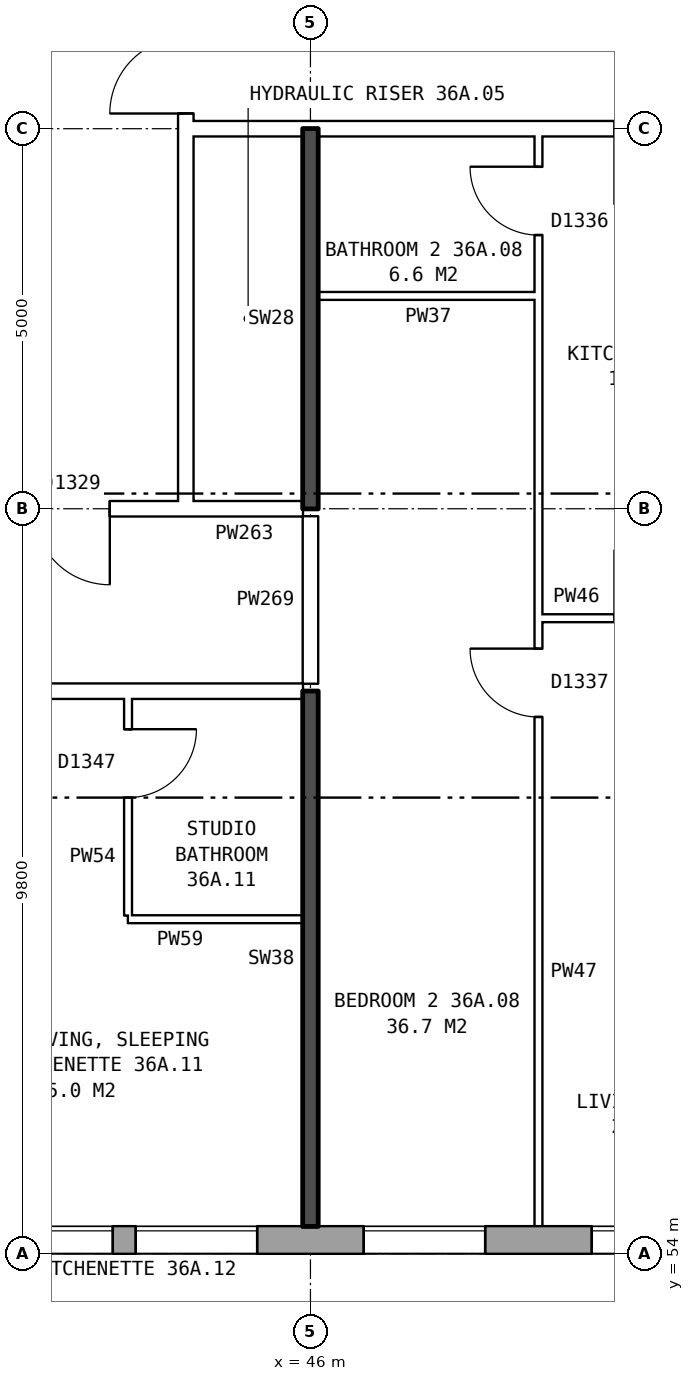
"""IFC4 building model, lengths in metres.
Left out: names, types, materials, properties, quantities, classifications, styles, units other than length and angle.
Written with IfcOpenShell. Run it as: python <this file> out.ifc"""

import sys

from ifc_helpers import new_model, si_unit, direction, frame, frame_2d, origin, place, context, subcontext, project, spatial, rectangle, extrude, element, fill, save


model = new_model("IFC4")
c1 = context("Model", 3, precision=1e-05, world=origin(), true_north=direction((0.0, 1.0)))
c2 = subcontext(c1, "Body", "Model", "MODEL_VIEW")
j1 = project(units=[si_unit("LENGTHUNIT", "METRE"), si_unit("PLANEANGLEUNIT", "RADIAN")], contexts=[c1])
p1 = place(None, origin())
s1 = spatial("IfcSite", under=j1, at=p1, CompositionType="ELEMENT")
p2 = place(p1, origin())
s2 = spatial("IfcBuilding", under=s1, at=p2, CompositionType="ELEMENT")
p3 = place(p2, frame((0.0, 0.0, 129.9)))
s3 = spatial("IfcBuildingStorey", under=s2, at=p3, CompositionType="ELEMENT", Elevation=129.9)
p4 = place(p3, frame((29.825, 54.18, 0.0), z_axis=(0.0, 0.0, 1.0), x_axis=(1.0, 0.0, 0.0)))
e1 = element("IfcWall", 1, at=p4, inside=s3, PredefinedType="STANDARD", context=c2, shape_type="SweptSolid", body=[
    extrude(rectangle(XDim=43.101, YDim=0.36, at=frame_2d((21.55, 0.0))), origin(), (0.0, 0.0, 1.0), 2.85),
])
p5 = place(p4, frame((1.875, 0.0, 0.8)))
e2 = element("IfcOpeningElement", 2, at=p5, cuts=e1, PredefinedType="OPENING", context=c2, shape_type="SweptSolid", body=[
    extrude(rectangle(XDim=1.6, YDim=1.8, at=frame_2d((0.8, 0.9))), frame((0.0, 0.19, 0.0), z_axis=(0.0, -1.0, 0.0), x_axis=(1.0, 0.0, 0.0)), (0.0, 0.0, 1.0), 0.38),
])
p6 = place(p4, frame((4.875, 0.0, 0.8)))
e3 = element("IfcOpeningElement", 3, at=p6, cuts=e1, PredefinedType="OPENING", context=c2, shape_type="SweptSolid", body=[
    extrude(rectangle(XDim=1.6, YDim=1.8, at=frame_2d((0.8, 0.9))), frame((0.0, 0.19, 0.0), z_axis=(0.0, -1.0, 0.0), x_axis=(1.0, 0.0, 0.0)), (0.0, 0.0, 1.0), 0.38),
])
p7 = place(p4, frame((6.775, 0.0, 0.8)))
e4 = element("IfcOpeningElement", 4, at=p7, cuts=e1, PredefinedType="OPENING", context=c2, shape_type="SweptSolid", body=[
    extrude(rectangle(XDim=1.6, YDim=1.8, at=frame_2d((0.8, 0.9))), frame((0.0, 0.19, 0.0), z_axis=(0.0, -1.0, 0.0), x_axis=(1.0, 0.0, 0.0)), (0.0, 0.0, 1.0), 0.38),
])
p8 = place(p4, frame((10.875, 0.0, 0.8)))
e5 = element("IfcOpeningElement", 5, at=p8, cuts=e1, PredefinedType="OPENING", context=c2, shape_type="SweptSolid", body=[
    extrude(rectangle(XDim=0.8, YDim=0.9, at=frame_2d((0.4, 0.45))), frame((0.0, 0.19, 0.0), z_axis=(0.0, -1.0, 0.0), x_axis=(1.0, 0.0, 0.0)), (0.0, 0.0, 1.0), 0.38),
])
p9 = place(p4, frame((13.875, 0.0, 0.8)))
e6 = element("IfcOpeningElement", 6, at=p9, cuts=e1, PredefinedType="OPENING", context=c2, shape_type="SweptSolid", body=[
    extrude(rectangle(XDim=1.6, YDim=1.8, at=frame_2d((0.8, 0.9))), frame((0.0, 0.19, 0.0), z_axis=(0.0, -1.0, 0.0), x_axis=(1.0, 0.0, 0.0)), (0.0, 0.0, 1.0), 0.38),
])
p10 = place(p4, frame((16.875, 0.0, 0.8)))
e7 = element("IfcOpeningElement", 7, at=p10, cuts=e1, PredefinedType="OPENING", context=c2, shape_type="SweptSolid", body=[
    extrude(rectangle(XDim=1.6, YDim=1.8, at=frame_2d((0.8, 0.9))), frame((0.0, 0.19, 0.0), z_axis=(0.0, -1.0, 0.0), x_axis=(1.0, 0.0, 0.0)), (0.0, 0.0, 1.0), 0.38),
])
p11 = place(p4, frame((19.875, 0.0, 0.8)))
e8 = element("IfcOpeningElement", 8, at=p11, cuts=e1, PredefinedType="OPENING", context=c2, shape_type="SweptSolid", body=[
    extrude(rectangle(XDim=1.6, YDim=1.8, at=frame_2d((0.8, 0.9))), frame((0.0, 0.19, 0.0), z_axis=(0.0, -1.0, 0.0), x_axis=(1.0, 0.0, 0.0)), (0.0, 0.0, 1.0), 0.38),
])
p12 = place(p4, frame((22.875, 0.0, 0.8)))
e9 = element("IfcOpeningElement", 9, at=p12, cuts=e1, PredefinedType="OPENING", context=c2, shape_type="SweptSolid", body=[
    extrude(rectangle(XDim=1.6, YDim=1.8, at=frame_2d((0.8, 0.9))), frame((0.0, 0.19, 0.0), z_axis=(0.0, -1.0, 0.0), x_axis=(1.0, 0.0, 0.0)), (0.0, 0.0, 1.0), 0.38),
])
p13 = place(p4, frame((25.875, 0.0, 0.8)))
e10 = element("IfcOpeningElement", 10, at=p13, cuts=e1, PredefinedType="OPENING", context=c2, shape_type="SweptSolid", body=[
    extrude(rectangle(XDim=1.6, YDim=1.8, at=frame_2d((0.8, 0.9))), frame((0.0, 0.19, 0.0), z_axis=(0.0, -1.0, 0.0), x_axis=(1.0, 0.0, 0.0)), (0.0, 0.0, 1.0), 0.38),
])
p14 = place(p4, frame((28.875, 0.0, 0.8)))
e11 = element("IfcOpeningElement", 11, at=p14, cuts=e1, PredefinedType="OPENING", context=c2, shape_type="SweptSolid", body=[
    extrude(rectangle(XDim=1.6, YDim=1.8, at=frame_2d((0.8, 0.9))), frame((0.0, 0.19, 0.0), z_axis=(0.0, -1.0, 0.0), x_axis=(1.0, 0.0, 0.0)), (0.0, 0.0, 1.0), 0.38),
])
p15 = place(p4, frame((31.325, 0.0, 0.15)))
e12 = element("IfcOpeningElement", 12, at=p15, cuts=e1, PredefinedType="OPENING", context=c2, shape_type="SweptSolid", body=[
    extrude(rectangle(XDim=0.6, YDim=1.8, at=frame_2d((0.3, 0.9))), frame((0.0, 0.19, 0.0), z_axis=(0.0, -1.0, 0.0), x_axis=(1.0, 0.0, 0.0)), (0.0, 0.0, 1.0), 0.38),
])
p16 = place(p4, frame((34.875, 0.0, 0.8)))
e13 = element("IfcOpeningElement", 13, at=p16, cuts=e1, PredefinedType="OPENING", context=c2, shape_type="SweptSolid", body=[
    extrude(rectangle(XDim=1.6, YDim=1.8, at=frame_2d((0.8, 0.9))), frame((0.0, 0.19, 0.0), z_axis=(0.0, -1.0, 0.0), x_axis=(1.0, 0.0, 0.0)), (0.0, 0.0, 1.0), 0.38),
])
p17 = place(p4, frame((37.875, 0.0, 0.8)))
e14 = element("IfcOpeningElement", 14, at=p17, cuts=e1, PredefinedType="OPENING", context=c2, shape_type="SweptSolid", body=[
    extrude(rectangle(XDim=1.6, YDim=1.8, at=frame_2d((0.8, 0.9))), frame((0.0, 0.19, 0.0), z_axis=(0.0, -1.0, 0.0), x_axis=(1.0, 0.0, 0.0)), (0.0, 0.0, 1.0), 0.38),
])
p18 = place(p4, frame((40.875, 0.0, 0.8)))
e15 = element("IfcOpeningElement", 15, at=p18, cuts=e1, PredefinedType="OPENING", context=c2, shape_type="SweptSolid", body=[
    extrude(rectangle(XDim=1.6, YDim=1.8, at=frame_2d((0.8, 0.9))), frame((0.0, 0.19, 0.0), z_axis=(0.0, -1.0, 0.0), x_axis=(1.0, 0.0, 0.0)), (0.0, 0.0, 1.0), 0.38),
])
p19 = place(p4, frame((8.675, 0.0, 1.3)))
e16 = element("IfcOpeningElement", 16, at=p19, cuts=e1, PredefinedType="OPENING", context=c2, shape_type="SweptSolid", body=[
    extrude(rectangle(XDim=0.6, YDim=1.2, at=frame_2d((0.3, 0.6))), frame((0.0, 0.19, 0.0), z_axis=(0.0, -1.0, 0.0), x_axis=(1.0, 0.0, 0.0)), (0.0, 0.0, 1.0), 0.38),
])
p20 = place(p4, frame((11.975, 0.0, 0.8)))
e17 = element("IfcOpeningElement", 17, at=p20, cuts=e1, PredefinedType="OPENING", context=c2, shape_type="SweptSolid", body=[
    extrude(rectangle(XDim=1.6, YDim=1.8, at=frame_2d((0.8, 0.9))), frame((0.0, 0.19, 0.0), z_axis=(0.0, -1.0, 0.0), x_axis=(1.0, 0.0, 0.0)), (0.0, 0.0, 1.0), 0.38),
])
p21 = place(p4, frame((32.225, 0.0, 0.25)))
e18 = element("IfcOpeningElement", 18, at=p21, cuts=e1, PredefinedType="OPENING", context=c2, shape_type="SweptSolid", body=[
    extrude(rectangle(XDim=0.6, YDim=0.9, at=frame_2d((0.3, 0.45))), frame((0.0, 0.19, 0.0), z_axis=(0.0, -1.0, 0.0), x_axis=(1.0, 0.0, 0.0)), (0.0, 0.0, 1.0), 0.38),
])
p22 = place(p3, frame((44.36, 63.9, 0.0), z_axis=(0.0, 0.0, 1.0), x_axis=(0.0, 1.0, 0.0)))
e19 = element("IfcWall", 19, at=p22, inside=s3, PredefinedType="PARTITIONING", context=c2, shape_type="SweptSolid", body=[
    extrude(rectangle(XDim=12.2, YDim=0.2, at=frame_2d((6.1, 0.0))), origin(), (0.0, 0.0, 1.0), 2.85),
])
p23 = place(p22, frame((5.1, 0.0, 0.0)))
e20 = element("IfcOpeningElement", 20, at=p23, cuts=e19, PredefinedType="OPENING", context=c2, shape_type="SweptSolid", body=[
    extrude(rectangle(XDim=2.0, YDim=2.1, at=frame_2d((1.0, 1.05))), frame((0.0, 0.11, 0.0), z_axis=(0.0, -1.0, 0.0), x_axis=(1.0, 0.0, 0.0)), (0.0, 0.0, 1.0), 0.22),
])
p24 = place(p3, frame((43.6, 58.4, 0.0), z_axis=(0.0, 0.0, 1.0), x_axis=(1.0, 0.0, 0.0)))
e21 = element("IfcWall", 21, at=p24, inside=s3, PredefinedType="PARTITIONING", context=c2, shape_type="SweptSolid", body=[
    extrude(rectangle(XDim=2.3, YDim=0.1, at=frame_2d((1.15, 0.0))), origin(), (0.0, 0.0, 1.0), 2.85),
])
p25 = place(p3, frame((27.11, 61.4, 0.0), z_axis=(0.0, 0.0, 1.0), x_axis=(1.0, 0.0, 0.0)))
e22 = element("IfcWall", 22, at=p25, inside=s3, PredefinedType="PARTITIONING", context=c2, shape_type="SweptSolid", body=[
    extrude(rectangle(XDim=18.79, YDim=0.2, at=frame_2d((9.395, 0.0))), origin(), (0.0, 0.0, 1.0), 2.85),
])
p26 = place(p25, frame((14.19, 0.0, 0.0)))
e23 = element("IfcOpeningElement", 23, at=p26, cuts=e22, PredefinedType="OPENING", context=c2, shape_type="SweptSolid", body=[
    extrude(rectangle(XDim=1.0, YDim=2.1, at=frame_2d((0.5, 1.05))), frame((0.0, 0.11, 0.0), z_axis=(0.0, -1.0, 0.0), x_axis=(1.0, 0.0, 0.0)), (0.0, 0.0, 1.0), 0.22),
])
p27 = place(p25, frame((8.19, 0.0, 0.0)))
e24 = element("IfcOpeningElement", 24, at=p27, cuts=e22, PredefinedType="OPENING", context=c2, shape_type="SweptSolid", body=[
    extrude(rectangle(XDim=1.0, YDim=2.1, at=frame_2d((0.5, 1.05))), frame((0.0, 0.11, 0.0), z_axis=(0.0, -1.0, 0.0), x_axis=(1.0, 0.0, 0.0)), (0.0, 0.0, 1.0), 0.22),
])
p28 = place(p25, frame((1.745, 0.0, 0.0)))
e25 = element("IfcOpeningElement", 25, at=p28, cuts=e22, PredefinedType="OPENING", context=c2, shape_type="SweptSolid", body=[
    extrude(rectangle(XDim=1.0, YDim=2.1, at=frame_2d((0.5, 1.05))), frame((0.0, 0.11, 0.0), z_axis=(0.0, -1.0, 0.0), x_axis=(1.0, 0.0, 0.0)), (0.0, 0.0, 1.0), 0.22),
])
p29 = place(p3, frame((49.0, 62.36, 0.0), z_axis=(0.0, 0.0, 1.0), x_axis=(1.0, 0.0, 0.0)))
e26 = element("IfcWall", 26, at=p29, inside=s3, PredefinedType="PARTITIONING", context=c2, shape_type="SweptSolid", body=[
    extrude(rectangle(XDim=2.9, YDim=0.1, at=frame_2d((1.45, 0.0))), origin(), (0.0, 0.0, 1.0), 2.85),
])
p30 = place(p29, frame((1.0, 0.0, 0.0)))
e27 = element("IfcOpeningElement", 27, at=p30, cuts=e26, PredefinedType="OPENING", context=c2, shape_type="SweptSolid", body=[
    extrude(rectangle(XDim=0.9, YDim=2.1, at=frame_2d((0.45, 1.05))), frame((0.0, 0.06, 0.0), z_axis=(0.0, -1.0, 0.0), x_axis=(1.0, 0.0, 0.0)), (0.0, 0.0, 1.0), 0.12),
])
p31 = place(p3, frame((41.36, 63.8, 0.0), z_axis=(0.0, 0.0, 1.0), x_axis=(1.0, 0.0, 0.0)))
e28 = element("IfcWall", 28, at=p31, inside=s3, PredefinedType="PARTITIONING", context=c2, shape_type="SweptSolid", body=[
    extrude(rectangle(XDim=3.0, YDim=0.2, at=frame_2d((1.5, 0.0))), origin(), (0.0, 0.0, 1.0), 2.85),
])
p32 = place(p31, frame((1.0, 0.0, 0.0)))
e29 = element("IfcOpeningElement", 29, at=p32, cuts=e28, PredefinedType="OPENING", context=c2, shape_type="SweptSolid", body=[
    extrude(rectangle(XDim=1.0, YDim=2.1, at=frame_2d((0.5, 1.05))), frame((0.0, 0.11, 0.0), z_axis=(0.0, -1.0, 0.0), x_axis=(1.0, 0.0, 0.0)), (0.0, 0.0, 1.0), 0.22),
])
p33 = place(p3, frame((44.36, 63.8, 0.0), z_axis=(0.0, 0.0, 1.0), x_axis=(1.0, 0.0, 0.0)))
e30 = element("IfcWall", 30, at=p33, inside=s3, PredefinedType="PARTITIONING", context=c2, shape_type="SweptSolid", body=[
    extrude(rectangle(XDim=1.54, YDim=0.2, at=frame_2d((0.77, 0.0))), origin(), (0.0, 0.0, 1.0), 2.85),
])
p34 = place(p3, frame((46.1, 66.6, 0.0), z_axis=(0.0, 0.0, 1.0), x_axis=(1.0, 0.0, 0.0)))
e31 = element("IfcWall", 31, at=p34, inside=s3, PredefinedType="PARTITIONING", context=c2, shape_type="SweptSolid", body=[
    extrude(rectangle(XDim=2.9, YDim=0.1, at=frame_2d((1.45, 0.0))), origin(), (0.0, 0.0, 1.0), 2.85),
])
p35 = place(p3, frame((44.36, 68.8, 0.0), z_axis=(0.0, 0.0, 1.0), x_axis=(1.0, 0.0, 0.0)))
e32 = element("IfcWall", 32, at=p35, inside=s3, PredefinedType="PARTITIONING", context=c2, shape_type="SweptSolid", body=[
    extrude(rectangle(XDim=19.28, YDim=0.2, at=frame_2d((9.64, 0.0))), origin(), (0.0, 0.0, 1.0), 2.85),
])
p36 = place(p35, frame((14.64, 0.0, 0.0)))
e33 = element("IfcOpeningElement", 33, at=p36, cuts=e32, PredefinedType="OPENING", context=c2, shape_type="SweptSolid", body=[
    extrude(rectangle(XDim=1.0, YDim=2.1, at=frame_2d((0.5, 1.05))), frame((0.0, 0.11, 0.0), z_axis=(0.0, -1.0, 0.0), x_axis=(1.0, 0.0, 0.0)), (0.0, 0.0, 1.0), 0.22),
])
p37 = place(p35, frame((5.64, 0.0, 0.0)))
e34 = element("IfcOpeningElement", 34, at=p37, cuts=e32, PredefinedType="OPENING", context=c2, shape_type="SweptSolid", body=[
    extrude(rectangle(XDim=1.0, YDim=2.1, at=frame_2d((0.5, 1.05))), frame((0.0, 0.11, 0.0), z_axis=(0.0, -1.0, 0.0), x_axis=(1.0, 0.0, 0.0)), (0.0, 0.0, 1.0), 0.22),
])
p38 = place(p3, frame((43.6, 58.45, 0.0), z_axis=(0.0, 0.0, 1.0), x_axis=(0.0, 1.0, 0.0)))
e35 = element("IfcWall", 35, at=p38, inside=s3, PredefinedType="PARTITIONING", context=c2, shape_type="SweptSolid", body=[
    extrude(rectangle(XDim=2.85, YDim=0.1, at=frame_2d((1.425, 0.0))), origin(), (0.0, 0.0, 1.0), 2.85),
])
p39 = place(p38, frame((1.55, 0.0, 0.0)))
e36 = element("IfcOpeningElement", 36, at=p39, cuts=e35, PredefinedType="OPENING", context=c2, shape_type="SweptSolid", body=[
    extrude(rectangle(XDim=0.9, YDim=2.1, at=frame_2d((0.45, 1.05))), frame((0.0, 0.06, 0.0), z_axis=(0.0, -1.0, 0.0), x_axis=(1.0, 0.0, 0.0)), (0.0, 0.0, 1.0), 0.12),
])
p40 = place(p3, frame((46.0, 54.36, 0.0), z_axis=(0.0, 0.0, 1.0), x_axis=(0.0, 1.0, 0.0)))
e37 = element("IfcWall", 37, at=p40, inside=s3, PredefinedType="SOLIDWALL", context=c2, shape_type="SweptSolid", body=[
    extrude(rectangle(XDim=7.04, YDim=0.2, at=frame_2d((3.52, 0.0))), origin(), (0.0, 0.0, 1.0), 2.85),
])
p41 = place(p3, frame((46.0, 61.5, 0.0), z_axis=(0.0, 0.0, 1.0), x_axis=(0.0, 1.0, 0.0)))
e38 = element("IfcWall", 38, at=p41, inside=s3, PredefinedType="PARTITIONING", context=c2, shape_type="SweptSolid", body=[
    extrude(rectangle(XDim=2.2, YDim=0.2, at=frame_2d((1.1, 0.0))), origin(), (0.0, 0.0, 1.0), 2.85),
])
p42 = place(p3, frame((46.0, 63.8, 0.0), z_axis=(0.0, 0.0, 1.0), x_axis=(0.0, 1.0, 0.0)))
e39 = element("IfcWall", 39, at=p42, inside=s3, PredefinedType="SOLIDWALL", context=c2, shape_type="SweptSolid", body=[
    extrude(rectangle(XDim=5.0, YDim=0.2, at=frame_2d((2.5, 0.0))), origin(), (0.0, 0.0, 1.0), 2.85),
])
p43 = place(p3, frame((49.0, 54.36, 0.0), z_axis=(0.0, 0.0, 1.0), x_axis=(0.0, 1.0, 0.0)))
e40 = element("IfcWall", 40, at=p43, inside=s3, PredefinedType="PARTITIONING", context=c2, shape_type="SweptSolid", body=[
    extrude(rectangle(XDim=14.34, YDim=0.1, at=frame_2d((7.17, 0.0))), origin(), (0.0, 0.0, 1.0), 2.85),
])
p44 = place(p43, frame((6.7, 0.0, 0.0)))
e41 = element("IfcOpeningElement", 41, at=p44, cuts=e40, PredefinedType="OPENING", context=c2, shape_type="SweptSolid", body=[
    extrude(rectangle(XDim=0.9, YDim=2.1, at=frame_2d((0.45, 1.05))), frame((0.0, 0.06, 0.0), z_axis=(0.0, -1.0, 0.0), x_axis=(1.0, 0.0, 0.0)), (0.0, 0.0, 1.0), 0.12),
])
p45 = place(p43, frame((13.04, 0.0, 0.0)))
e42 = element("IfcOpeningElement", 42, at=p45, cuts=e40, PredefinedType="OPENING", context=c2, shape_type="SweptSolid", body=[
    extrude(rectangle(XDim=0.9, YDim=2.1, at=frame_2d((0.45, 1.05))), frame((0.0, 0.06, 0.0), z_axis=(0.0, -1.0, 0.0), x_axis=(1.0, 0.0, 0.0)), (0.0, 0.0, 1.0), 0.12),
])
p46 = place(p9, origin())
e43 = element("IfcWindow", 43, at=p46, inside=s3, PartitioningType="SINGLE_PANEL", PredefinedType="WINDOW", context=c2, shape_type="SweptSolid", body=[
    extrude(rectangle(XDim=1.6, YDim=1.8, at=frame_2d((0.8, 0.9))), frame((0.0, 0.15, 0.0), z_axis=(0.0, -1.0, 0.0), x_axis=(1.0, 0.0, 0.0)), (0.0, 0.0, 1.0), 0.06),
])
fill(e6, e43)
p47 = place(p10, origin())
e44 = element("IfcWindow", 44, at=p47, inside=s3, PartitioningType="SINGLE_PANEL", PredefinedType="WINDOW", context=c2, shape_type="SweptSolid", body=[
    extrude(rectangle(XDim=1.6, YDim=1.8, at=frame_2d((0.8, 0.9))), frame((0.0, 0.15, 0.0), z_axis=(0.0, -1.0, 0.0), x_axis=(1.0, 0.0, 0.0)), (0.0, 0.0, 1.0), 0.06),
])
fill(e7, e44)
p48 = place(p11, origin())
e45 = element("IfcWindow", 45, at=p48, inside=s3, PartitioningType="SINGLE_PANEL", PredefinedType="WINDOW", context=c2, shape_type="SweptSolid", body=[
    extrude(rectangle(XDim=1.6, YDim=1.8, at=frame_2d((0.8, 0.9))), frame((0.0, 0.15, 0.0), z_axis=(0.0, -1.0, 0.0), x_axis=(1.0, 0.0, 0.0)), (0.0, 0.0, 1.0), 0.06),
])
fill(e8, e45)
p49 = place(p23, origin())
e46 = element("IfcDoor", 46, at=p49, inside=s3, OperationType="DOUBLE_DOOR_SINGLE_SWING", PredefinedType="DOOR", context=c2, shape_type="SweptSolid", body=[
    extrude(rectangle(XDim=2.0, YDim=2.1, at=frame_2d((1.0, 1.05))), frame((0.0, 0.025, 0.0), z_axis=(0.0, -1.0, 0.0), x_axis=(1.0, 0.0, 0.0)), (0.0, 0.0, 1.0), 0.05),
])
fill(e20, e46)
p50 = place(p32, frame((1.0, 0.0, 0.0), z_axis=(0.0, 0.0, 1.0), x_axis=(-1.0, 0.0, 0.0)))
e47 = element("IfcDoor", 47, at=p50, inside=s3, OperationType="SINGLE_SWING_LEFT", PredefinedType="DOOR", context=c2, shape_type="SweptSolid", body=[
    extrude(rectangle(XDim=1.0, YDim=2.1, at=frame_2d((0.5, 1.05))), frame((0.0, 0.025, 0.0), z_axis=(0.0, -1.0, 0.0), x_axis=(1.0, 0.0, 0.0)), (0.0, 0.0, 1.0), 0.05),
])
fill(e29, e47)
p51 = place(p44, origin())
e48 = element("IfcDoor", 48, at=p51, inside=s3, OperationType="SINGLE_SWING_RIGHT", PredefinedType="DOOR", context=c2, shape_type="SweptSolid", body=[
    extrude(rectangle(XDim=0.9, YDim=2.1, at=frame_2d((0.45, 1.05))), frame((0.0, 0.025, 0.0), z_axis=(0.0, -1.0, 0.0), x_axis=(1.0, 0.0, 0.0)), (0.0, 0.0, 1.0), 0.05),
])
fill(e41, e48)
p52 = place(p45, origin())
e49 = element("IfcDoor", 49, at=p52, inside=s3, OperationType="SINGLE_SWING_RIGHT", PredefinedType="DOOR", context=c2, shape_type="SweptSolid", body=[
    extrude(rectangle(XDim=0.9, YDim=2.1, at=frame_2d((0.45, 1.05))), frame((0.0, 0.025, 0.0), z_axis=(0.0, -1.0, 0.0), x_axis=(1.0, 0.0, 0.0)), (0.0, 0.0, 1.0), 0.05),
])
fill(e42, e49)
p53 = place(p39, frame((0.9, 0.0, 0.0), z_axis=(0.0, 0.0, 1.0), x_axis=(-1.0, 0.0, 0.0)))
e50 = element("IfcDoor", 50, at=p53, inside=s3, OperationType="SINGLE_SWING_LEFT", PredefinedType="DOOR", context=c2, shape_type="SweptSolid", body=[
    extrude(rectangle(XDim=0.9, YDim=2.1, at=frame_2d((0.45, 1.05))), frame((0.0, 0.025, 0.0), z_axis=(0.0, -1.0, 0.0), x_axis=(1.0, 0.0, 0.0)), (0.0, 0.0, 1.0), 0.05),
])
fill(e36, e50)
p54 = place(p20, origin())
e51 = element("IfcWindow", 51, at=p54, inside=s3, PartitioningType="SINGLE_PANEL", PredefinedType="WINDOW", context=c2, shape_type="SweptSolid", body=[
    extrude(rectangle(XDim=1.6, YDim=1.8, at=frame_2d((0.8, 0.9))), frame((0.0, 0.15, 0.0), z_axis=(0.0, -1.0, 0.0), x_axis=(1.0, 0.0, 0.0)), (0.0, 0.0, 1.0), 0.06),
])
fill(e17, e51)
save(model, sys.argv[1])
